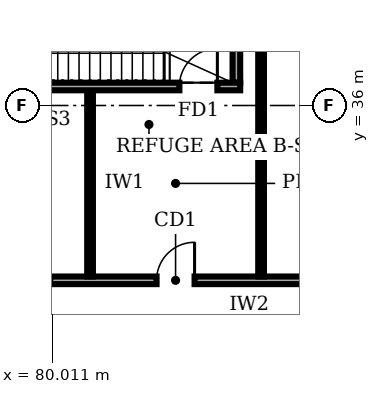
"""IFC4 building model, lengths in metres.
Left out: names, types, materials, properties, quantities, classifications, styles, units other than length and angle.
Written with IfcOpenShell. Run it as: python <this file> out.ifc"""

import sys

from ifc_helpers import new_model, si_unit, direction, frame, frame_2d, origin, place, context, subcontext, project, spatial, rectangle, extrude, element, fill, save


model = new_model("IFC4")
c1 = context("Model", 3, precision=1e-05, world=origin(), true_north=direction((0.0, 1.0)))
c2 = subcontext(c1, "Body", "Model", "MODEL_VIEW")
j1 = project(units=[si_unit("LENGTHUNIT", "METRE"), si_unit("PLANEANGLEUNIT", "RADIAN")], contexts=[c1])
p1 = place(None, origin())
s1 = spatial("IfcSite", under=j1, at=p1, CompositionType="ELEMENT")
p2 = place(p1, origin())
s2 = spatial("IfcBuilding", under=s1, at=p2, CompositionType="ELEMENT")
p3 = place(p2, frame((0.0, 0.0, 16.0)))
s3 = spatial("IfcBuildingStorey", under=s2, at=p3, CompositionType="ELEMENT", Elevation=16.0)
p4 = place(p3, frame((89.35, 31.4, 0.0), z_axis=(0.0, 0.0, 1.0), x_axis=(-1.0, 0.0, 0.0)))
e1 = element("IfcWall", 1, at=p4, inside=s3, PredefinedType="SOLIDWALL", context=c2, shape_type="SweptSolid", body=[
    extrude(rectangle(XDim=16.9, YDim=0.2, at=frame_2d((8.45, 0.0))), origin(), (0.0, 0.0, 1.0), 4.7),
])
p5 = place(p4, frame((13.925, 0.0, 0.0)))
e2 = element("IfcOpeningElement", 2, at=p5, cuts=e1, PredefinedType="OPENING", context=c2, shape_type="SweptSolid", body=[
    extrude(rectangle(XDim=1.8, YDim=2.1, at=frame_2d((0.9, 1.05))), frame((0.0, 0.11, 0.0), z_axis=(0.0, -1.0, 0.0), x_axis=(1.0, 0.0, 0.0)), (0.0, 0.0, 1.0), 0.22),
])
p6 = place(p4, frame((9.4, 0.0, 0.0)))
e3 = element("IfcOpeningElement", 3, at=p6, cuts=e1, PredefinedType="OPENING", context=c2, shape_type="SweptSolid", body=[
    extrude(rectangle(XDim=2.4, YDim=2.7, at=frame_2d((1.2, 1.35))), frame((0.0, 0.11, 0.0), z_axis=(0.0, -1.0, 0.0), x_axis=(1.0, 0.0, 0.0)), (0.0, 0.0, 1.0), 0.22),
])
p7 = place(p4, frame((0.925, 0.0, 0.0)))
e4 = element("IfcOpeningElement", 4, at=p7, cuts=e1, PredefinedType="OPENING", context=c2, shape_type="SweptSolid", body=[
    extrude(rectangle(XDim=1.8, YDim=2.1, at=frame_2d((0.9, 1.05))), frame((0.0, 0.11, 0.0), z_axis=(0.0, -1.0, 0.0), x_axis=(1.0, 0.0, 0.0)), (0.0, 0.0, 1.0), 0.22),
])
p8 = place(p4, frame((5.6, 0.0, 0.0)))
e5 = element("IfcOpeningElement", 5, at=p8, cuts=e1, PredefinedType="OPENING", context=c2, shape_type="SweptSolid", body=[
    extrude(rectangle(XDim=1.0, YDim=2.1, at=frame_2d((0.5, 1.05))), frame((0.0, 0.11, 0.0), z_axis=(0.0, -1.0, 0.0), x_axis=(1.0, 0.0, 0.0)), (0.0, 0.0, 1.0), 0.22),
])
p9 = place(p3, frame((81.0, 31.5, 0.0), z_axis=(0.0, 0.0, 1.0), x_axis=(0.0, 1.0, 0.0)))
e6 = element("IfcWall", 6, at=p9, inside=s3, PredefinedType="PARTITIONING", context=c2, shape_type="SweptSolid", body=[
    extrude(rectangle(XDim=4.9, YDim=0.15, at=frame_2d((2.45, 0.0))), origin(), (0.0, 0.0, 1.0), 4.7),
])
p10 = place(p3, frame((85.5, 31.5, 0.0), z_axis=(0.0, 0.0, 1.0), x_axis=(0.0, 1.0, 0.0)))
e7 = element("IfcWall", 7, at=p10, inside=s3, PredefinedType="PARTITIONING", context=c2, shape_type="SweptSolid", body=[
    extrude(rectangle(XDim=17.7, YDim=0.15, at=frame_2d((8.85, 0.0))), origin(), (0.0, 0.0, 1.0), 4.7),
])
p11 = place(p10, frame((12.85, 0.0, 0.0)))
e8 = element("IfcOpeningElement", 8, at=p11, cuts=e7, PredefinedType="OPENING", context=c2, shape_type="SweptSolid", body=[
    extrude(rectangle(XDim=1.0, YDim=2.1, at=frame_2d((0.5, 1.05))), frame((0.0, 0.085, 0.0), z_axis=(0.0, -1.0, 0.0), x_axis=(1.0, 0.0, 0.0)), (0.0, 0.0, 1.0), 0.17),
])
p12 = place(p3, frame((77.05, 36.5, 0.0), z_axis=(0.0, 0.0, 1.0), x_axis=(1.0, 0.0, 0.0)))
e9 = element("IfcWall", 9, at=p12, inside=s3, PredefinedType="SOLIDWALL", context=c2, shape_type="SweptSolid", body=[
    extrude(rectangle(XDim=7.9, YDim=0.2, at=frame_2d((3.95, 0.0))), origin(), (0.0, 0.0, 1.0), 4.7),
])
p13 = place(p12, frame((6.3, 0.0, 0.0)))
e10 = element("IfcOpeningElement", 10, at=p13, cuts=e9, PredefinedType="OPENING", context=c2, shape_type="SweptSolid", body=[
    extrude(rectangle(XDim=1.0, YDim=2.1, at=frame_2d((0.5, 1.05))), frame((0.0, 0.11, 0.0), z_axis=(0.0, -1.0, 0.0), x_axis=(1.0, 0.0, 0.0)), (0.0, 0.0, 1.0), 0.22),
])
p14 = place(p3, frame((84.85, 36.6, 0.0), z_axis=(0.0, 0.0, 1.0), x_axis=(0.0, 1.0, 0.0)))
e11 = element("IfcWall", 11, at=p14, inside=s3, PredefinedType="SOLIDWALL", context=c2, shape_type="SweptSolid", body=[
    extrude(rectangle(XDim=3.4, YDim=0.2, at=frame_2d((1.7, 0.0))), origin(), (0.0, 0.0, 1.0), 4.7),
])
p15 = place(p8, frame((1.0, 0.0, 0.0), z_axis=(0.0, 0.0, 1.0), x_axis=(-1.0, 0.0, 0.0)))
e12 = element("IfcDoor", 12, at=p15, inside=s3, OperationType="SINGLE_SWING_RIGHT", PredefinedType="DOOR", context=c2, shape_type="SweptSolid", body=[
    extrude(rectangle(XDim=1.0, YDim=2.1, at=frame_2d((0.5, 1.05))), frame((0.0, 0.025, 0.0), z_axis=(0.0, -1.0, 0.0), x_axis=(1.0, 0.0, 0.0)), (0.0, 0.0, 1.0), 0.05),
])
fill(e5, e12)
p16 = place(p13, origin())
e13 = element("IfcDoor", 13, at=p16, inside=s3, OperationType="SINGLE_SWING_RIGHT", PredefinedType="DOOR", context=c2, shape_type="SweptSolid", body=[
    extrude(rectangle(XDim=1.0, YDim=2.1, at=frame_2d((0.5, 1.05))), frame((0.0, 0.025, 0.0), z_axis=(0.0, -1.0, 0.0), x_axis=(1.0, 0.0, 0.0)), (0.0, 0.0, 1.0), 0.05),
])
fill(e10, e13)
save(model, sys.argv[1])
